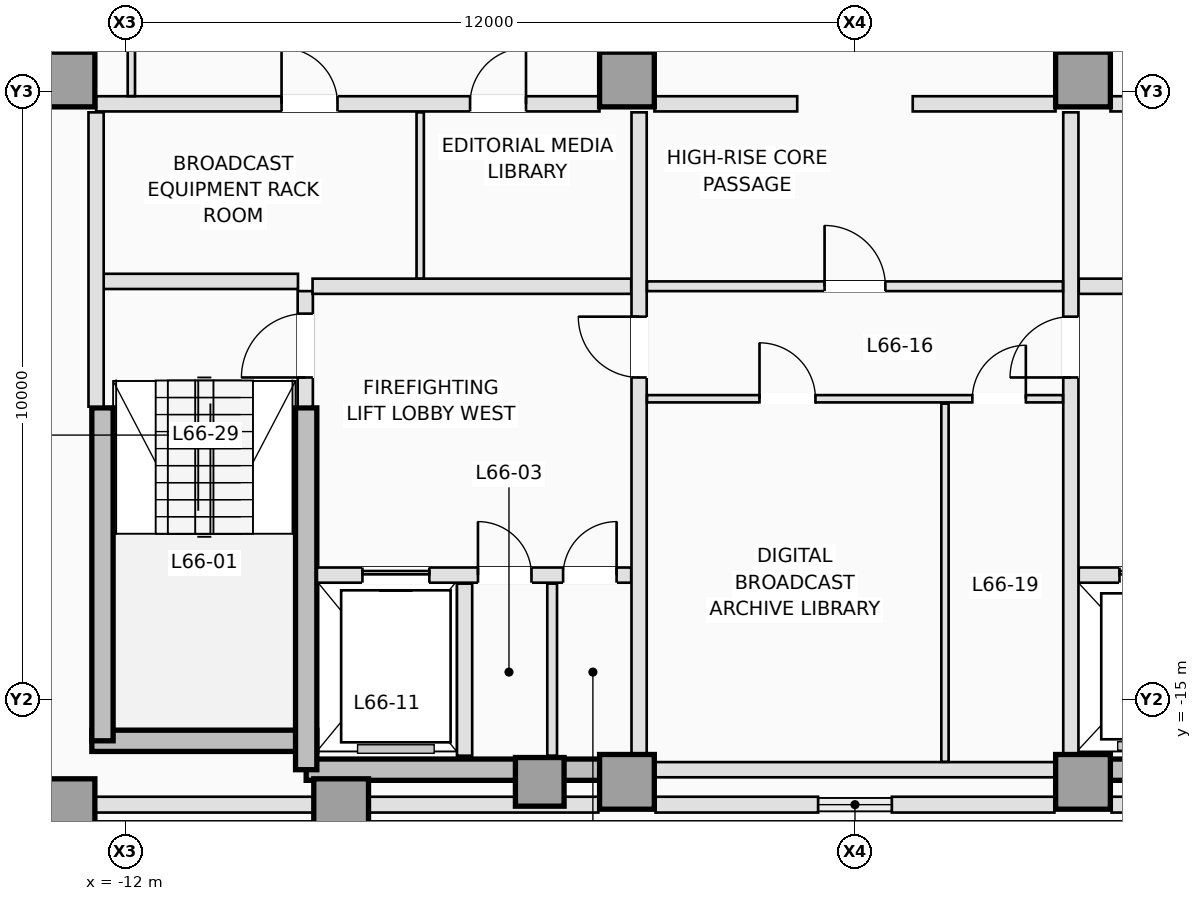
"""IFC4 building model, lengths in metres.
Left out: names, types, materials, properties, quantities, classifications, styles, units other than length and angle.
Written with IfcOpenShell. Run it as: python <this file> out.ifc"""

import sys

from ifc_helpers import new_model, si_unit, direction, frame, frame_2d, origin, origin_2d, place, context, subcontext, project, spatial, rectangle, extrude, element, fill, save


model = new_model("IFC4")
c1 = context("Model", 3, precision=1e-05, world=origin(), true_north=direction((0.0, 1.0)))
c2 = subcontext(c1, "Body", "Model", "MODEL_VIEW")
j1 = project(units=[si_unit("LENGTHUNIT", "METRE"), si_unit("PLANEANGLEUNIT", "RADIAN")], contexts=[c1])
p1 = place(None, origin())
s1 = spatial("IfcSite", under=j1, at=p1, CompositionType="ELEMENT")
p2 = place(p1, origin())
s2 = spatial("IfcBuilding", under=s1, at=p2, CompositionType="ELEMENT")
p3 = place(p2, frame((0.0, 0.0, 239.4)))
s3 = spatial("IfcBuildingStorey", under=s2, at=p3, CompositionType="ELEMENT", Elevation=239.4)
p4 = place(p3, frame((-12.55, -15.675, 0.0), z_axis=(0.0, 0.0, 1.0), x_axis=(1.0, 0.0, 0.0)))
e1 = element("IfcWall", 1, at=p4, inside=s3, PredefinedType="SHEAR", context=c2, shape_type="SweptSolid", body=[
    extrude(rectangle(XDim=3.7, YDim=0.35, at=frame_2d((1.85, 0.0))), origin(), (0.0, 0.0, 1.0), 3.5),
])
for number, where, z_axis, x_axis in (
    (2, (-9.025, -16.15, 0.0), (0.0, 0.0, 1.0), (1.0, 0.0, 0.0)),
    (3, (3.75, -16.15, 0.0), (0.0, 0.0, 1.0), (1.0, 0.0, 0.0)),
):
    element("IfcWall", number, at=place(p3, frame(where, z_axis=z_axis, x_axis=x_axis)), inside=s3, PredefinedType="SHEAR", context=c2, shape_type="SweptSolid", body=[
        extrude(rectangle(XDim=5.275, YDim=0.35, at=frame_2d((2.637, 0.0))), origin(), (0.0, 0.0, 1.0), 3.5),
    ])
p5 = place(p3, frame((-12.375, -15.675, 0.0), z_axis=(0.0, 0.0, 1.0), x_axis=(0.0, 1.0, 0.0)))
e4 = element("IfcWall", 4, at=p5, inside=s3, PredefinedType="SHEAR", context=c2, shape_type="SweptSolid", body=[
    extrude(rectangle(XDim=5.475, YDim=0.35, at=frame_2d((2.738, 0.0))), origin(), (0.0, 0.0, 1.0), 3.5),
])
p6 = place(p3, frame((-9.025, -16.15, 0.0), z_axis=(0.0, 0.0, 1.0), x_axis=(0.0, 1.0, 0.0)))
e5 = element("IfcWall", 5, at=p6, inside=s3, PredefinedType="SHEAR", context=c2, shape_type="SweptSolid", body=[
    extrude(rectangle(XDim=5.95, YDim=0.35, at=frame_2d((2.975, 0.0))), origin(), (0.0, 0.0, 1.0), 3.5),
])
for number, where, z_axis, x_axis in (
    (6, (-12.95, -16.75, 0.0), (0.0, 0.0, 1.0), (1.0, 0.0, 0.0)),
    (7, (-8.45, -16.75, 0.0), (0.0, 0.0, 1.0), (1.0, 0.0, 0.0)),
    (8, (-3.75, -16.35, 0.0), (0.0, 0.0, 1.0), (1.0, 0.0, 0.0)),
    (9, (3.75, -16.35, 0.0), (0.0, 0.0, 1.0), (1.0, 0.0, 0.0)),
    (10, (-12.95, -4.8, 0.0), (0.0, 0.0, 1.0), (1.0, 0.0, 0.0)),
    (11, (-3.75, -4.8, 0.0), (0.0, 0.0, 1.0), (1.0, 0.0, 0.0)),
    (12, (3.75, -4.8, 0.0), (0.0, 0.0, 1.0), (1.0, 0.0, 0.0)),
):
    element("IfcColumn", number, at=place(p3, frame(where, z_axis=z_axis, x_axis=x_axis)), inside=s3, PredefinedType="COLUMN", context=c2, shape_type="SweptSolid", body=[
        extrude(rectangle(XDim=0.9, YDim=0.9, at=origin_2d()), origin(), (0.0, 0.0, 1.0), 3.5),
    ])
p7 = place(p3, frame((-5.184, -16.35, 0.0), z_axis=(0.0, 0.0, 1.0), x_axis=(0.0, 1.0, 0.0)))
e13 = element("IfcColumn", 13, at=p7, inside=s3, PredefinedType="COLUMN", context=c2, shape_type="SweptSolid", body=[
    extrude(rectangle(XDim=0.8, YDim=0.8, at=origin_2d()), origin(), (0.0, 0.0, 1.0), 3.5),
])
for number, where, z_axis, x_axis in (
    (14, (15.493, -16.725, 0.0), (0.0, 0.0, 1.0), (-1.0, 0.0, 0.0)),
    (15, (-4.22, -16.725, 0.0), (0.0, 0.0, 1.0), (-1.0, 0.0, 0.0)),
):
    element("IfcWall", number, at=place(p3, frame(where, z_axis=z_axis, x_axis=x_axis)), inside=s3, PredefinedType="STANDARD", context=c2, shape_type="SweptSolid", body=[
        extrude(rectangle(XDim=11.273, YDim=0.26, at=frame_2d((5.636, 0.0))), origin(), (0.0, 0.0, 1.0), 2.79),
    ])
for number, where, z_axis, x_axis in (
    (16, (3.28, -16.725, 0.0), (0.0, 0.0, 1.0), (-1.0, 0.0, 0.0)),
    (17, (-0.606, -16.725, 0.0), (0.0, 0.0, 1.0), (-1.0, 0.0, 0.0)),
):
    element("IfcWall", number, at=place(p3, frame(where, z_axis=z_axis, x_axis=x_axis)), inside=s3, PredefinedType="STANDARD", context=c2, shape_type="SweptSolid", body=[
        extrude(rectangle(XDim=2.674, YDim=0.26, at=frame_2d((1.337, 0.0))), origin(), (0.0, 0.0, 1.0), 3.25),
    ])
p8 = place(p3, frame((-9.04, -10.18, 0.0), z_axis=(0.0, 0.0, 1.0), x_axis=(0.0, 1.0, 0.0)))
e18 = element("IfcWall", 18, at=p8, inside=s3, PredefinedType="PARTITIONING", context=c2, shape_type="SweptSolid", body=[
    extrude(rectangle(XDim=1.9, YDim=0.25, at=frame_2d((0.95, 0.0))), origin(), (0.0, 0.0, 1.0), 3.25),
])
p9 = place(p8, frame((0.48, 0.0, 0.0)))
e19 = element("IfcOpeningElement", 19, at=p9, cuts=e18, PredefinedType="OPENING", context=c2, shape_type="SweptSolid", body=[
    extrude(rectangle(XDim=1.05, YDim=2.15, at=frame_2d((0.525, 1.075))), frame((0.0, 0.135, 0.0), z_axis=(0.0, -1.0, 0.0), x_axis=(1.0, 0.0, 0.0)), (0.0, 0.0, 1.0), 0.27),
])
p10 = place(p3, frame((-12.38, -8.12, 0.0), z_axis=(0.0, 0.0, 1.0), x_axis=(1.0, 0.0, 0.0)))
e20 = element("IfcWall", 20, at=p10, inside=s3, PredefinedType="PARTITIONING", context=c2, shape_type="SweptSolid", body=[
    extrude(rectangle(XDim=3.22, YDim=0.25, at=frame_2d((1.61, 0.0))), origin(), (0.0, 0.0, 1.0), 3.25),
])
p11 = place(p3, frame((-12.48, -10.18, 0.0), z_axis=(0.0, 0.0, 1.0), x_axis=(0.0, 1.0, 0.0)))
e21 = element("IfcWall", 21, at=p11, inside=s3, PredefinedType="PARTITIONING", context=c2, shape_type="SweptSolid", body=[
    extrude(rectangle(XDim=4.84, YDim=0.25, at=frame_2d((2.42, 0.0))), origin(), (0.0, 0.0, 1.0), 3.25),
])
p12 = place(p3, frame((-8.848, -12.95, 0.0), z_axis=(0.0, 0.0, 1.0), x_axis=(1.0, 0.0, 0.0)))
e22 = element("IfcWall", 22, at=p12, inside=s3, PredefinedType="PARTITIONING", context=c2, shape_type="SweptSolid", body=[
    extrude(rectangle(XDim=5.168, YDim=0.25, at=frame_2d((2.584, 0.0))), origin(), (0.0, 0.0, 1.0), 3.25),
])
p13 = place(p12, frame((0.748, 0.0, 0.0)))
e23 = element("IfcOpeningElement", 23, at=p13, cuts=e22, PredefinedType="OPENING", context=c2, shape_type="SweptSolid", body=[
    extrude(rectangle(XDim=1.1, YDim=2.15, at=frame_2d((0.55, 1.075))), frame((0.0, 0.135, 0.0), z_axis=(0.0, -1.0, 0.0), x_axis=(1.0, 0.0, 0.0)), (0.0, 0.0, 1.0), 0.27),
])
p14 = place(p12, frame((2.648, 0.0, 0.0)))
e24 = element("IfcOpeningElement", 24, at=p14, cuts=e22, PredefinedType="OPENING", context=c2, shape_type="SweptSolid", body=[
    extrude(rectangle(XDim=0.88, YDim=2.1, at=frame_2d((0.44, 1.05))), frame((0.0, 0.135, 0.0), z_axis=(0.0, -1.0, 0.0), x_axis=(1.0, 0.0, 0.0)), (0.0, 0.0, 1.0), 0.27),
])
p15 = place(p12, frame((4.048, 0.0, 0.0)))
e25 = element("IfcOpeningElement", 25, at=p15, cuts=e22, PredefinedType="OPENING", context=c2, shape_type="SweptSolid", body=[
    extrude(rectangle(XDim=0.88, YDim=2.1, at=frame_2d((0.44, 1.05))), frame((0.0, 0.135, 0.0), z_axis=(0.0, -1.0, 0.0), x_axis=(1.0, 0.0, 0.0)), (0.0, 0.0, 1.0), 0.27),
])
p16 = place(p3, frame((3.68, -12.95, 0.0), z_axis=(0.0, 0.0, 1.0), x_axis=(1.0, 0.0, 0.0)))
e26 = element("IfcWall", 26, at=p16, inside=s3, PredefinedType="PARTITIONING", context=c2, shape_type="SweptSolid", body=[
    extrude(rectangle(XDim=5.168, YDim=0.25, at=frame_2d((2.584, 0.0))), origin(), (0.0, 0.0, 1.0), 3.25),
])
p17 = place(p16, frame((3.32, 0.0, 0.0)))
e27 = element("IfcOpeningElement", 27, at=p17, cuts=e26, PredefinedType="OPENING", context=c2, shape_type="SweptSolid", body=[
    extrude(rectangle(XDim=1.1, YDim=2.15, at=frame_2d((0.55, 1.075))), frame((0.0, 0.135, 0.0), z_axis=(0.0, -1.0, 0.0), x_axis=(1.0, 0.0, 0.0)), (0.0, 0.0, 1.0), 0.27),
])
p18 = place(p16, frame((0.67, 0.0, 0.0)))
e28 = element("IfcOpeningElement", 28, at=p18, cuts=e26, PredefinedType="OPENING", context=c2, shape_type="SweptSolid", body=[
    extrude(rectangle(XDim=1.2, YDim=2.15, at=frame_2d((0.6, 1.075))), frame((0.0, 0.135, 0.0), z_axis=(0.0, -1.0, 0.0), x_axis=(1.0, 0.0, 0.0)), (0.0, 0.0, 1.0), 0.27),
])
p19 = place(p3, frame((-6.42, -15.92, 0.0), z_axis=(0.0, 0.0, 1.0), x_axis=(0.0, 1.0, 0.0)))
e29 = element("IfcWall", 29, at=p19, inside=s3, PredefinedType="PARTITIONING", context=c2, shape_type="SweptSolid", body=[
    extrude(rectangle(XDim=2.83, YDim=0.25, at=frame_2d((1.415, 0.0))), origin(), (0.0, 0.0, 1.0), 3.25),
])
p20 = place(p3, frame((-4.98, -15.92, 0.0), z_axis=(0.0, 0.0, 1.0), x_axis=(0.0, 1.0, 0.0)))
e30 = element("IfcWall", 30, at=p20, inside=s3, PredefinedType="PARTITIONING", context=c2, shape_type="SweptSolid", body=[
    extrude(rectangle(XDim=2.83, YDim=0.16, at=frame_2d((1.415, 0.0))), origin(), (0.0, 0.0, 1.0), 3.25),
])
for number, where, z_axis, x_axis in (
    (31, (-8.92, -8.2, 0.0), (0.0, 0.0, 1.0), (1.0, 0.0, 0.0)),
    (32, (3.68, -8.2, 0.0), (0.0, 0.0, 1.0), (1.0, 0.0, 0.0)),
):
    element("IfcWall", number, at=place(p3, frame(where, z_axis=z_axis, x_axis=x_axis)), inside=s3, PredefinedType="PARTITIONING", context=c2, shape_type="SweptSolid", body=[
        extrude(rectangle(XDim=5.24, YDim=0.25, at=frame_2d((2.62, 0.0))), origin(), (0.0, 0.0, 1.0), 3.25),
    ])
p21 = place(p3, frame((-3.55, -15.898, 0.0), z_axis=(0.0, 0.0, 1.0), x_axis=(0.0, 1.0, 0.0)))
e33 = element("IfcWall", 33, at=p21, inside=s3, PredefinedType="PARTITIONING", context=c2, shape_type="SweptSolid", body=[
    extrude(rectangle(XDim=10.558, YDim=0.25, at=frame_2d((5.279, 0.0))), origin(), (0.0, 0.0, 1.0), 3.25),
])
p22 = place(p21, frame((6.198, 0.0, 0.0)))
e34 = element("IfcOpeningElement", 34, at=p22, cuts=e33, PredefinedType="OPENING", context=c2, shape_type="SweptSolid", body=[
    extrude(rectangle(XDim=1.0, YDim=2.15, at=frame_2d((0.5, 1.075))), frame((0.0, 0.135, 0.0), z_axis=(0.0, -1.0, 0.0), x_axis=(1.0, 0.0, 0.0)), (0.0, 0.0, 1.0), 0.27),
])
p23 = place(p3, frame((3.55, -15.898, 0.0), z_axis=(0.0, 0.0, 1.0), x_axis=(0.0, 1.0, 0.0)))
e35 = element("IfcWall", 35, at=p23, inside=s3, PredefinedType="PARTITIONING", context=c2, shape_type="SweptSolid", body=[
    extrude(rectangle(XDim=10.558, YDim=0.25, at=frame_2d((5.279, 0.0))), origin(), (0.0, 0.0, 1.0), 3.25),
])
p24 = place(p23, frame((6.198, 0.0, 0.0)))
e36 = element("IfcOpeningElement", 36, at=p24, cuts=e35, PredefinedType="OPENING", context=c2, shape_type="SweptSolid", body=[
    extrude(rectangle(XDim=1.0, YDim=2.15, at=frame_2d((0.5, 1.075))), frame((0.0, 0.135, 0.0), z_axis=(0.0, -1.0, 0.0), x_axis=(1.0, 0.0, 0.0)), (0.0, 0.0, 1.0), 0.27),
])
p25 = place(p3, frame((-12.48, -5.2, 0.0), z_axis=(0.0, 0.0, 1.0), x_axis=(1.0, 0.0, 0.0)))
e37 = element("IfcWall", 37, at=p25, inside=s3, PredefinedType="PARTITIONING", context=c2, shape_type="SweptSolid", body=[
    extrude(rectangle(XDim=8.278, YDim=0.25, at=frame_2d((4.139, 0.0))), origin(), (0.0, 0.0, 1.0), 3.25),
])
p26 = place(p25, frame((3.05, 0.0, 0.0)))
e38 = element("IfcOpeningElement", 38, at=p26, cuts=e37, PredefinedType="OPENING", context=c2, shape_type="SweptSolid", body=[
    extrude(rectangle(XDim=0.92, YDim=2.12, at=frame_2d((0.46, 1.06))), frame((0.0, 0.135, 0.0), z_axis=(0.0, -1.0, 0.0), x_axis=(1.0, 0.0, 0.0)), (0.0, 0.0, 1.0), 0.27),
])
p27 = place(p25, frame((6.15, 0.0, 0.0)))
e39 = element("IfcOpeningElement", 39, at=p27, cuts=e37, PredefinedType="OPENING", context=c2, shape_type="SweptSolid", body=[
    extrude(rectangle(XDim=0.92, YDim=2.12, at=frame_2d((0.46, 1.06))), frame((0.0, 0.135, 0.0), z_axis=(0.0, -1.0, 0.0), x_axis=(1.0, 0.0, 0.0)), (0.0, 0.0, 1.0), 0.27),
])
p28 = place(p3, frame((4.202, -5.2, 0.0), z_axis=(0.0, 0.0, 1.0), x_axis=(1.0, 0.0, 0.0)))
e40 = element("IfcWall", 40, at=p28, inside=s3, PredefinedType="PARTITIONING", context=c2, shape_type="SweptSolid", body=[
    extrude(rectangle(XDim=8.278, YDim=0.25, at=frame_2d((4.139, 0.0))), origin(), (0.0, 0.0, 1.0), 3.25),
])
p29 = place(p28, frame((0.748, 0.0, 0.0)))
e41 = element("IfcOpeningElement", 41, at=p29, cuts=e40, PredefinedType="OPENING", context=c2, shape_type="SweptSolid", body=[
    extrude(rectangle(XDim=1.0, YDim=2.15, at=frame_2d((0.5, 1.075))), frame((0.0, 0.135, 0.0), z_axis=(0.0, -1.0, 0.0), x_axis=(1.0, 0.0, 0.0)), (0.0, 0.0, 1.0), 0.27),
])
p30 = place(p28, frame((2.698, 0.0, 0.0)))
e42 = element("IfcOpeningElement", 42, at=p30, cuts=e40, PredefinedType="OPENING", context=c2, shape_type="SweptSolid", body=[
    extrude(rectangle(XDim=1.0, YDim=2.15, at=frame_2d((0.5, 1.075))), frame((0.0, 0.135, 0.0), z_axis=(0.0, -1.0, 0.0), x_axis=(1.0, 0.0, 0.0)), (0.0, 0.0, 1.0), 0.27),
])
p31 = place(p28, frame((4.648, 0.0, 0.0)))
e43 = element("IfcOpeningElement", 43, at=p31, cuts=e40, PredefinedType="OPENING", context=c2, shape_type="SweptSolid", body=[
    extrude(rectangle(XDim=1.0, YDim=2.15, at=frame_2d((0.5, 1.075))), frame((0.0, 0.135, 0.0), z_axis=(0.0, -1.0, 0.0), x_axis=(1.0, 0.0, 0.0)), (0.0, 0.0, 1.0), 0.27),
])
p32 = place(p28, frame((6.598, 0.0, 0.0)))
e44 = element("IfcOpeningElement", 44, at=p32, cuts=e40, PredefinedType="OPENING", context=c2, shape_type="SweptSolid", body=[
    extrude(rectangle(XDim=1.0, YDim=2.15, at=frame_2d((0.5, 1.075))), frame((0.0, 0.135, 0.0), z_axis=(0.0, -1.0, 0.0), x_axis=(1.0, 0.0, 0.0)), (0.0, 0.0, 1.0), 0.27),
])
for number, where, z_axis, x_axis in (
    (45, (-3.298, -5.2, 0.0), (0.0, 0.0, 1.0), (1.0, 0.0, 0.0)),
    (46, (0.95, -5.2, 0.0), (0.0, 0.0, 1.0), (1.0, 0.0, 0.0)),
):
    element("IfcWall", number, at=place(p3, frame(where, z_axis=z_axis, x_axis=x_axis)), inside=s3, PredefinedType="PARTITIONING", context=c2, shape_type="SweptSolid", body=[
        extrude(rectangle(XDim=2.348, YDim=0.25, at=frame_2d((1.174, 0.0))), origin(), (0.0, 0.0, 1.0), 3.25),
    ])
p33 = place(p3, frame((-7.15, -8.073, 0.0), z_axis=(0.0, 0.0, 1.0), x_axis=(0.0, 1.0, 0.0)))
e47 = element("IfcWall", 47, at=p33, inside=s3, PredefinedType="PARTITIONING", context=c2, shape_type="SweptSolid", body=[
    extrude(rectangle(XDim=2.733, YDim=0.12, at=frame_2d((1.366, 0.0))), origin(), (0.0, 0.0, 1.0), 3.25),
])
p34 = place(p3, frame((-3.298, -16.15, 0.0), z_axis=(0.0, 0.0, 1.0), x_axis=(1.0, 0.0, 0.0)))
e48 = element("IfcWall", 48, at=p34, inside=s3, PredefinedType="PARTITIONING", context=c2, shape_type="SweptSolid", body=[
    extrude(rectangle(XDim=6.596, YDim=0.25, at=frame_2d((3.298, 0.0))), origin(), (0.0, 0.0, 1.0), 2.844),
])
p35 = place(p3, frame((-3.42, -8.2, 0.0), z_axis=(0.0, 0.0, 1.0), x_axis=(1.0, 0.0, 0.0)))
e49 = element("IfcWall", 49, at=p35, inside=s3, PredefinedType="PARTITIONING", context=c2, shape_type="SweptSolid", body=[
    extrude(rectangle(XDim=6.84, YDim=0.16, at=frame_2d((3.42, 0.0))), origin(), (0.0, 0.0, 1.0), 3.25),
])
p36 = place(p35, frame((2.92, 0.0, 0.0)))
e50 = element("IfcOpeningElement", 50, at=p36, cuts=e49, PredefinedType="OPENING", context=c2, shape_type="SweptSolid", body=[
    extrude(rectangle(XDim=1.0, YDim=2.15, at=frame_2d((0.5, 1.075))), frame((0.0, 0.09, 0.0), z_axis=(0.0, -1.0, 0.0), x_axis=(1.0, 0.0, 0.0)), (0.0, 0.0, 1.0), 0.18),
])
p37 = place(p3, frame((-3.42, -10.05, 0.0), z_axis=(0.0, 0.0, 1.0), x_axis=(1.0, 0.0, 0.0)))
e51 = element("IfcWall", 51, at=p37, inside=s3, PredefinedType="PARTITIONING", context=c2, shape_type="SweptSolid", body=[
    extrude(rectangle(XDim=6.84, YDim=0.12, at=frame_2d((3.42, 0.0))), origin(), (0.0, 0.0, 1.0), 3.25),
])
p38 = place(p37, frame((1.85, 0.0, 0.0)))
e52 = element("IfcOpeningElement", 52, at=p38, cuts=e51, PredefinedType="OPENING", context=c2, shape_type="SweptSolid", body=[
    extrude(rectangle(XDim=0.92, YDim=2.12, at=frame_2d((0.46, 1.06))), frame((0.0, 0.07, 0.0), z_axis=(0.0, -1.0, 0.0), x_axis=(1.0, 0.0, 0.0)), (0.0, 0.0, 1.0), 0.14),
])
p39 = place(p37, frame((5.35, 0.0, 0.0)))
e53 = element("IfcOpeningElement", 53, at=p39, cuts=e51, PredefinedType="OPENING", context=c2, shape_type="SweptSolid", body=[
    extrude(rectangle(XDim=0.88, YDim=2.12, at=frame_2d((0.44, 1.06))), frame((0.0, 0.07, 0.0), z_axis=(0.0, -1.0, 0.0), x_axis=(1.0, 0.0, 0.0)), (0.0, 0.0, 1.0), 0.14),
])
p40 = place(p3, frame((1.48, -16.02, 0.0), z_axis=(0.0, 0.0, 1.0), x_axis=(0.0, 1.0, 0.0)))
e54 = element("IfcWall", 54, at=p40, inside=s3, PredefinedType="PARTITIONING", context=c2, shape_type="SweptSolid", body=[
    extrude(rectangle(XDim=5.89, YDim=0.12, at=frame_2d((2.945, 0.0))), origin(), (0.0, 0.0, 1.0), 3.25),
])
p41 = place(p3, frame((-11.9, -5.073, 0.0), z_axis=(0.0, 0.0, 1.0), x_axis=(0.0, 1.0, 0.0)))
e55 = element("IfcWall", 55, at=p41, inside=s3, PredefinedType="PARTITIONING", context=c2, shape_type="SweptSolid", body=[
    extrude(rectangle(XDim=2.343, YDim=0.12, at=frame_2d((1.171, 0.0))), origin(), (0.0, 0.0, 1.0), 3.25),
])
p42 = place(p41, frame((0.783, 0.0, 0.0)))
e56 = element("IfcOpeningElement", 56, at=p42, cuts=e55, PredefinedType="OPENING", context=c2, shape_type="SweptSolid", body=[
    extrude(rectangle(XDim=0.92, YDim=2.12, at=frame_2d((0.46, 1.06))), frame((0.0, 0.07, 0.0), z_axis=(0.0, -1.0, 0.0), x_axis=(1.0, 0.0, 0.0)), (0.0, 0.0, 1.0), 0.14),
])
p43 = place(p13, origin())
e57 = element("IfcDoor", 57, at=p43, inside=s3, OperationType="SLIDING_TO_LEFT", PredefinedType="DOOR", context=c2, shape_type="SweptSolid", body=[
    extrude(rectangle(XDim=1.1, YDim=2.15, at=frame_2d((0.55, 1.075))), frame((0.0, 0.025, 0.0), z_axis=(0.0, -1.0, 0.0), x_axis=(1.0, 0.0, 0.0)), (0.0, 0.0, 1.0), 0.05),
])
fill(e23, e57)
p44 = place(p18, origin())
e58 = element("IfcDoor", 58, at=p44, inside=s3, OperationType="SLIDING_TO_LEFT", PredefinedType="DOOR", context=c2, shape_type="SweptSolid", body=[
    extrude(rectangle(XDim=1.2, YDim=2.15, at=frame_2d((0.6, 1.075))), frame((0.0, 0.025, 0.0), z_axis=(0.0, -1.0, 0.0), x_axis=(1.0, 0.0, 0.0)), (0.0, 0.0, 1.0), 0.05),
])
fill(e28, e58)
p45 = place(p9, origin())
e59 = element("IfcDoor", 59, at=p45, inside=s3, OperationType="SINGLE_SWING_LEFT", PredefinedType="DOOR", context=c2, shape_type="SweptSolid", body=[
    extrude(rectangle(XDim=1.05, YDim=2.15, at=frame_2d((0.525, 1.075))), frame((0.0, 0.025, 0.0), z_axis=(0.0, -1.0, 0.0), x_axis=(1.0, 0.0, 0.0)), (0.0, 0.0, 1.0), 0.05),
])
fill(e19, e59)
p46 = place(p14, origin())
e60 = element("IfcDoor", 60, at=p46, inside=s3, OperationType="SINGLE_SWING_LEFT", PredefinedType="TRAPDOOR", context=c2, shape_type="SweptSolid", body=[
    extrude(rectangle(XDim=0.88, YDim=2.1, at=frame_2d((0.44, 1.05))), frame((0.0, 0.025, 0.0), z_axis=(0.0, -1.0, 0.0), x_axis=(1.0, 0.0, 0.0)), (0.0, 0.0, 1.0), 0.05),
])
fill(e24, e60)
p47 = place(p15, origin())
e61 = element("IfcDoor", 61, at=p47, inside=s3, OperationType="SINGLE_SWING_RIGHT", PredefinedType="TRAPDOOR", context=c2, shape_type="SweptSolid", body=[
    extrude(rectangle(XDim=0.88, YDim=2.1, at=frame_2d((0.44, 1.05))), frame((0.0, 0.025, 0.0), z_axis=(0.0, -1.0, 0.0), x_axis=(1.0, 0.0, 0.0)), (0.0, 0.0, 1.0), 0.05),
])
fill(e25, e61)
p48 = place(p22, origin())
e62 = element("IfcDoor", 62, at=p48, inside=s3, OperationType="SINGLE_SWING_RIGHT", PredefinedType="DOOR", context=c2, shape_type="SweptSolid", body=[
    extrude(rectangle(XDim=1.0, YDim=2.15, at=frame_2d((0.5, 1.075))), frame((0.0, 0.025, 0.0), z_axis=(0.0, -1.0, 0.0), x_axis=(1.0, 0.0, 0.0)), (0.0, 0.0, 1.0), 0.05),
])
fill(e34, e62)
p49 = place(p24, origin())
e63 = element("IfcDoor", 63, at=p49, inside=s3, OperationType="SINGLE_SWING_LEFT", PredefinedType="DOOR", context=c2, shape_type="SweptSolid", body=[
    extrude(rectangle(XDim=1.0, YDim=2.15, at=frame_2d((0.5, 1.075))), frame((0.0, 0.025, 0.0), z_axis=(0.0, -1.0, 0.0), x_axis=(1.0, 0.0, 0.0)), (0.0, 0.0, 1.0), 0.05),
])
fill(e36, e63)
p50 = place(p26, origin())
e64 = element("IfcDoor", 64, at=p50, inside=s3, OperationType="SINGLE_SWING_LEFT", PredefinedType="DOOR", context=c2, shape_type="SweptSolid", body=[
    extrude(rectangle(XDim=0.92, YDim=2.12, at=frame_2d((0.46, 1.06))), frame((0.0, 0.025, 0.0), z_axis=(0.0, -1.0, 0.0), x_axis=(1.0, 0.0, 0.0)), (0.0, 0.0, 1.0), 0.05),
])
fill(e38, e64)
p51 = place(p27, origin())
e65 = element("IfcDoor", 65, at=p51, inside=s3, OperationType="SINGLE_SWING_RIGHT", PredefinedType="DOOR", context=c2, shape_type="SweptSolid", body=[
    extrude(rectangle(XDim=0.92, YDim=2.12, at=frame_2d((0.46, 1.06))), frame((0.0, 0.025, 0.0), z_axis=(0.0, -1.0, 0.0), x_axis=(1.0, 0.0, 0.0)), (0.0, 0.0, 1.0), 0.05),
])
fill(e39, e65)
p52 = place(p36, origin())
e66 = element("IfcDoor", 66, at=p52, inside=s3, OperationType="SINGLE_SWING_LEFT", PredefinedType="DOOR", context=c2, shape_type="SweptSolid", body=[
    extrude(rectangle(XDim=1.0, YDim=2.15, at=frame_2d((0.5, 1.075))), frame((0.0, 0.025, 0.0), z_axis=(0.0, -1.0, 0.0), x_axis=(1.0, 0.0, 0.0)), (0.0, 0.0, 1.0), 0.05),
])
fill(e50, e66)
p53 = place(p38, origin())
e67 = element("IfcDoor", 67, at=p53, inside=s3, OperationType="SINGLE_SWING_LEFT", PredefinedType="DOOR", context=c2, shape_type="SweptSolid", body=[
    extrude(rectangle(XDim=0.92, YDim=2.12, at=frame_2d((0.46, 1.06))), frame((0.0, 0.025, 0.0), z_axis=(0.0, -1.0, 0.0), x_axis=(1.0, 0.0, 0.0)), (0.0, 0.0, 1.0), 0.05),
])
fill(e52, e67)
p54 = place(p39, origin())
e68 = element("IfcDoor", 68, at=p54, inside=s3, OperationType="SINGLE_SWING_RIGHT", PredefinedType="DOOR", context=c2, shape_type="SweptSolid", body=[
    extrude(rectangle(XDim=0.88, YDim=2.12, at=frame_2d((0.44, 1.06))), frame((0.0, 0.025, 0.0), z_axis=(0.0, -1.0, 0.0), x_axis=(1.0, 0.0, 0.0)), (0.0, 0.0, 1.0), 0.05),
])
fill(e53, e68)
save(model, sys.argv[1])
